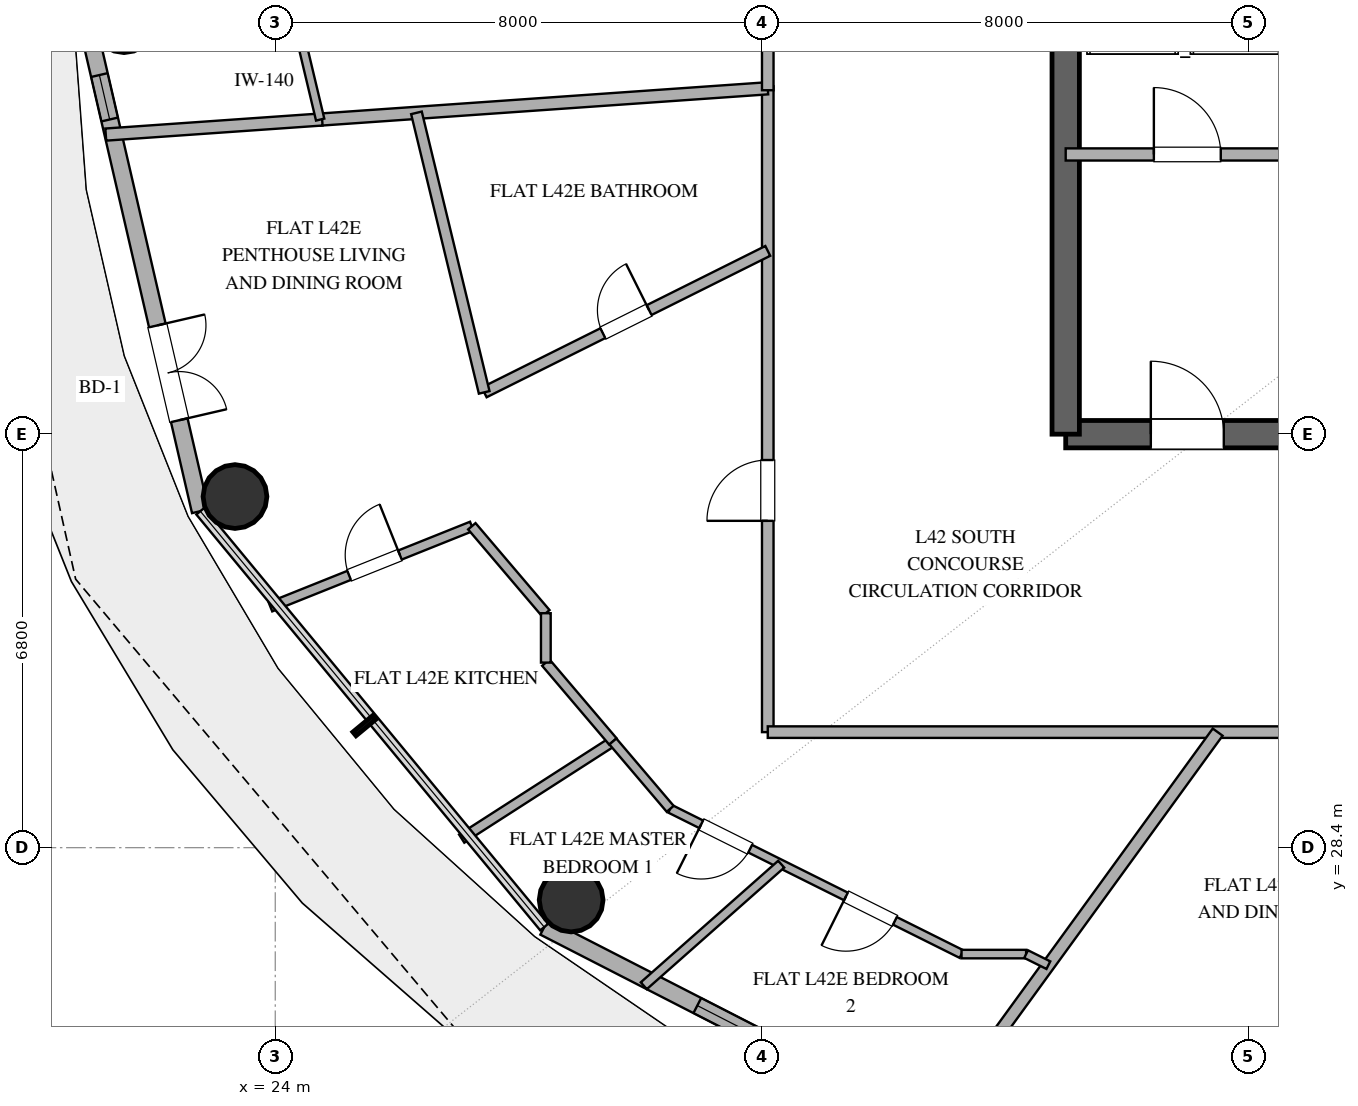
"""IFC4 building model, lengths in metres.
Left out: names, types, materials, properties, quantities, classifications, styles, units other than length and angle.
Written with IfcOpenShell. Run it as: python <this file> out.ifc"""

import sys

from ifc_helpers import new_model, si_unit, direction, frame, frame_2d, origin, origin_2d, place, context, subcontext, project, spatial, rectangle, hollow_circle, extrude, element, fill, save


model = new_model("IFC4")
c1 = context("Model", 3, precision=1e-05, world=origin(), true_north=direction((0.0, 1.0)))
c2 = subcontext(c1, "Body", "Model", "MODEL_VIEW")
j1 = project(units=[si_unit("LENGTHUNIT", "METRE"), si_unit("PLANEANGLEUNIT", "RADIAN")], contexts=[c1])
p1 = place(None, origin())
s1 = spatial("IfcSite", under=j1, at=p1, CompositionType="ELEMENT")
p2 = place(p1, origin())
s2 = spatial("IfcBuilding", under=s1, at=p2, CompositionType="ELEMENT")
p3 = place(p2, frame((0.0, 0.0, 168.6)))
s3 = spatial("IfcBuildingStorey", under=s2, at=p3, CompositionType="ELEMENT", Elevation=168.6)
p4 = place(p3, frame((37.0, 35.2, 0.0), z_axis=(0.0, 0.0, 1.0), x_axis=(1.0, 0.0, 0.0)))
e1 = element("IfcWall", 1, at=p4, inside=s3, PredefinedType="SHEAR", context=c2, shape_type="SweptSolid", body=[
    extrude(rectangle(XDim=4.0, YDim=0.45, at=frame_2d((2.0, 0.0))), origin(), (0.0, 0.0, 1.0), 3.38),
])
p5 = place(p4, frame((1.4, 0.0, 0.0)))
e2 = element("IfcOpeningElement", 2, at=p5, cuts=e1, PredefinedType="OPENING", context=c2, shape_type="SweptSolid", body=[
    extrude(rectangle(XDim=1.2, YDim=2.15, at=frame_2d((0.6, 1.075))), frame((0.0, 0.235, 0.0), z_axis=(0.0, -1.0, 0.0), x_axis=(1.0, 0.0, 0.0)), (0.0, 0.0, 1.0), 0.47),
])
p6 = place(p3, frame((37.0, 35.2, 0.0), z_axis=(0.0, 0.0, 1.0), x_axis=(0.0, 1.0, 0.0)))
e3 = element("IfcWall", 3, at=p6, inside=s3, PredefinedType="SHEAR", context=c2, shape_type="SweptSolid", body=[
    extrude(rectangle(XDim=13.6, YDim=0.45, at=frame_2d((6.8, 0.0))), origin(), (0.0, 0.0, 1.0), 3.38),
])
for number, where, z_axis, x_axis in (
    (4, (21.513, 42.0, 0.0), (0.0, 0.0, 1.0), (1.0, 0.0, 0.0)),
    (5, (23.338, 34.174, 0.0), (0.0, 0.0, 1.0), (1.0, 0.0, 0.0)),
    (6, (28.866, 27.54, 0.0), (0.0, 0.0, 1.0), (1.0, 0.0, 0.0)),
):
    element("IfcColumn", number, at=place(p3, frame(where, z_axis=z_axis, x_axis=x_axis)), inside=s3, PredefinedType="COLUMN", context=c2, shape_type="SweptSolid", body=[
        extrude(hollow_circle(Radius=0.525, WallThickness=0.028, at=origin_2d()), origin(), (0.0, 0.0, 1.0), 3.38),
    ])
p7 = place(p3, frame((20.901, 42.0, 0.0), z_axis=(0.0, 0.0, 1.0), x_axis=(0.225473184558, -0.974249374157, 0.0)))
e7 = element("IfcWall", 7, at=p7, inside=s3, PredefinedType="SOLIDWALL", context=c2, shape_type="SweptSolid", body=[
    extrude(rectangle(XDim=8.28, YDim=0.28, at=frame_2d((4.14, 0.0))), origin(), (0.0, 0.0, 1.0), 3.38),
])
p8 = place(p7, frame((5.144, 0.0, 0.0)))
e8 = element("IfcOpeningElement", 8, at=p8, cuts=e7, PredefinedType="OPENING", context=c2, shape_type="SweptSolid", body=[
    extrude(rectangle(XDim=1.6, YDim=2.25, at=frame_2d((0.8, 1.125))), frame((0.0, 0.15, 0.0), z_axis=(0.0, -1.0, 0.0), x_axis=(1.0, 0.0, 0.0)), (0.0, 0.0, 1.0), 0.3),
])
p9 = place(p7, frame((0.918, 0.0, 0.85)))
e9 = element("IfcOpeningElement", 9, at=p9, cuts=e7, PredefinedType="OPENING", context=c2, shape_type="SweptSolid", body=[
    extrude(rectangle(XDim=0.75, YDim=1.8, at=frame_2d((0.375, 0.9))), frame((0.0, 0.15, 0.0), z_axis=(0.0, -1.0, 0.0), x_axis=(1.0, 0.0, 0.0)), (0.0, 0.0, 1.0), 0.3),
])
p10 = place(p3, frame((28.424, 27.094, 0.0), z_axis=(0.0, 0.0, 1.0), x_axis=(0.889872523182, -0.456209263919, 0.0)))
e10 = element("IfcWall", 10, at=p10, inside=s3, PredefinedType="SOLIDWALL", context=c2, shape_type="SweptSolid", body=[
    extrude(rectangle(XDim=10.016, YDim=0.28, at=frame_2d((5.008, 0.0))), origin(), (0.0, 0.0, 1.0), 3.38),
])
p11 = place(p10, frame((2.829, 0.0, 0.85)))
e11 = element("IfcOpeningElement", 11, at=p11, cuts=e10, PredefinedType="OPENING", context=c2, shape_type="SweptSolid", body=[
    extrude(rectangle(XDim=1.35, YDim=1.8, at=frame_2d((0.675, 0.9))), frame((0.0, 0.15, 0.0), z_axis=(0.0, -1.0, 0.0), x_axis=(1.0, 0.0, 0.0)), (0.0, 0.0, 1.0), 0.3),
])
p12 = place(p10, frame((4.861, 0.0, 0.85)))
e12 = element("IfcOpeningElement", 12, at=p12, cuts=e10, PredefinedType="OPENING", context=c2, shape_type="SweptSolid", body=[
    extrude(rectangle(XDim=1.35, YDim=1.8, at=frame_2d((0.675, 0.9))), frame((0.0, 0.15, 0.0), z_axis=(0.0, -1.0, 0.0), x_axis=(1.0, 0.0, 0.0)), (0.0, 0.0, 1.0), 0.3),
])
p13 = place(p10, frame((7.479, 0.0, 0.85)))
e13 = element("IfcOpeningElement", 13, at=p13, cuts=e10, PredefinedType="OPENING", context=c2, shape_type="SweptSolid", body=[
    extrude(rectangle(XDim=1.0, YDim=1.8, at=frame_2d((0.5, 0.9))), frame((0.0, 0.15, 0.0), z_axis=(0.0, -1.0, 0.0), x_axis=(1.0, 0.0, 0.0)), (0.0, 0.0, 1.0), 0.3),
])
p14 = place(p3, frame((37.0, 39.8, 0.0), z_axis=(0.0, 0.0, 1.0), x_axis=(1.0, 0.0, 0.0)))
e14 = element("IfcWall", 14, at=p14, inside=s3, PredefinedType="SOLIDWALL", context=c2, shape_type="SweptSolid", body=[
    extrude(rectangle(XDim=4.0, YDim=0.2, at=frame_2d((2.0, 0.0))), origin(), (0.0, 0.0, 1.0), 2.74),
])
p15 = place(p14, frame((1.45, 0.0, 0.0)))
e15 = element("IfcOpeningElement", 15, at=p15, cuts=e14, PredefinedType="OPENING", context=c2, shape_type="SweptSolid", body=[
    extrude(rectangle(XDim=1.1, YDim=2.15, at=frame_2d((0.55, 1.075))), frame((0.0, 0.11, 0.0), z_axis=(0.0, -1.0, 0.0), x_axis=(1.0, 0.0, 0.0)), (0.0, 0.0, 1.0), 0.22),
])
p16 = place(p3, frame((32.1, 30.3, 0.0), z_axis=(0.0, 0.0, 1.0), x_axis=(0.0, 1.0, 0.0)))
e16 = element("IfcWall", 16, at=p16, inside=s3, PredefinedType="PARTITIONING", context=c2, shape_type="SweptSolid", body=[
    extrude(rectangle(XDim=10.62, YDim=0.19, at=frame_2d((5.31, 0.0))), origin(), (0.0, 0.0, 1.0), 2.74),
])
p17 = place(p16, frame((3.475, 0.0, 0.0)))
e17 = element("IfcOpeningElement", 17, at=p17, cuts=e16, PredefinedType="OPENING", context=c2, shape_type="SweptSolid", body=[
    extrude(rectangle(XDim=1.0, YDim=2.2, at=frame_2d((0.5, 1.1))), frame((0.0, 0.105, 0.0), z_axis=(0.0, -1.0, 0.0), x_axis=(1.0, 0.0, 0.0)), (0.0, 0.0, 1.0), 0.21),
])
p18 = place(p3, frame((48.308, 30.3, 0.0), z_axis=(0.0, 0.0, 1.0), x_axis=(-1.0, 0.0, 0.0)))
e18 = element("IfcWall", 18, at=p18, inside=s3, PredefinedType="PARTITIONING", context=c2, shape_type="SweptSolid", body=[
    extrude(rectangle(XDim=16.208, YDim=0.19, at=frame_2d((8.104, 0.0))), origin(), (0.0, 0.0, 1.0), 2.74),
])
p19 = place(p18, frame((5.52, 0.0, 0.0)))
e19 = element("IfcOpeningElement", 19, at=p19, cuts=e18, PredefinedType="OPENING", context=c2, shape_type="SweptSolid", body=[
    extrude(rectangle(XDim=1.0, YDim=2.2, at=frame_2d((0.5, 1.1))), frame((0.0, 0.105, 0.0), z_axis=(0.0, -1.0, 0.0), x_axis=(1.0, 0.0, 0.0)), (0.0, 0.0, 1.0), 0.21),
])
p20 = place(p3, frame((32.1, 40.888, 0.0), z_axis=(0.0, 0.0, 1.0), x_axis=(-0.997562906323, -0.069772830877, 0.0)))
e20 = element("IfcWall", 20, at=p20, inside=s3, PredefinedType="PARTITIONING", context=c2, shape_type="SweptSolid", body=[
    extrude(rectangle(XDim=7.38, YDim=0.2, at=frame_2d((3.69, 0.0))), origin(), (0.0, 0.0, 1.0), 2.74),
])
p21 = place(p3, frame((32.1, 40.856, 0.0), z_axis=(0.0, 0.0, 1.0), x_axis=(0.0, 1.0, 0.0)))
e21 = element("IfcWall", 21, at=p21, inside=s3, PredefinedType="PARTITIONING", context=c2, shape_type="SweptSolid", body=[
    extrude(rectangle(XDim=12.844, YDim=0.19, at=frame_2d((6.422, 0.0))), origin(), (0.0, 0.0, 1.0), 2.74),
])
p22 = place(p3, frame((27.436, 35.887, 0.0), z_axis=(0.0, 0.0, 1.0), x_axis=(0.894857716432, 0.446351506485, 0.0)))
e22 = element("IfcWall", 22, at=p22, inside=s3, PredefinedType="PLUMBINGWALL", context=c2, shape_type="SweptSolid", body=[
    extrude(rectangle(XDim=5.212, YDim=0.18, at=frame_2d((2.606, 0.0))), origin(), (0.0, 0.0, 1.0), 2.74),
])
p23 = place(p22, frame((2.181, 0.0, 0.0)))
e23 = element("IfcOpeningElement", 23, at=p23, cuts=e22, PredefinedType="OPENING", context=c2, shape_type="SweptSolid", body=[
    extrude(rectangle(XDim=0.85, YDim=2.1, at=frame_2d((0.425, 1.05))), frame((0.0, 0.1, 0.0), z_axis=(0.0, -1.0, 0.0), x_axis=(1.0, 0.0, 0.0)), (0.0, 0.0, 1.0), 0.2),
])
p24 = place(p3, frame((34.726, 23.73, 0.0), z_axis=(0.0, 0.0, 1.0), x_axis=(0.587785528328, 0.809016793823, 0.0)))
e24 = element("IfcWall", 24, at=p24, inside=s3, PredefinedType="PARTITIONING", context=c2, shape_type="SweptSolid", body=[
    extrude(rectangle(XDim=8.121, YDim=0.2, at=frame_2d((4.061, 0.0))), origin(), (0.0, 0.0, 1.0), 2.74),
])
p25 = place(p3, frame((26.322, 40.484, 0.0), z_axis=(0.0, 0.0, 1.0), x_axis=(0.235484788327, -0.971878034769, 0.0)))
e25 = element("IfcWall", 25, at=p25, inside=s3, PredefinedType="PLUMBINGWALL", context=c2, shape_type="SweptSolid", body=[
    extrude(rectangle(XDim=4.73, YDim=0.18, at=frame_2d((2.365, 0.0))), origin(), (0.0, 0.0, 1.0), 2.74),
])
p26 = place(p3, frame((23.921, 32.36, 0.0), z_axis=(0.0, 0.0, 1.0), x_axis=(0.928353942887, 0.371697399408, 0.0)))
e26 = element("IfcWall", 26, at=p26, inside=s3, PredefinedType="PLUMBINGWALL", context=c2, shape_type="SweptSolid", body=[
    extrude(rectangle(XDim=3.568, YDim=0.16, at=frame_2d((1.784, 0.0))), origin(), (0.0, 0.0, 1.0), 2.74),
])
p27 = place(p26, frame((1.394, 0.0, 0.0)))
e27 = element("IfcOpeningElement", 27, at=p27, cuts=e26, PredefinedType="OPENING", context=c2, shape_type="SweptSolid", body=[
    extrude(rectangle(XDim=0.9, YDim=2.1, at=frame_2d((0.45, 1.05))), frame((0.0, 0.09, 0.0), z_axis=(0.0, -1.0, 0.0), x_axis=(1.0, 0.0, 0.0)), (0.0, 0.0, 1.0), 0.18),
])
p28 = place(p3, frame((21.212, 40.127, 0.0), z_axis=(0.0, 0.0, 1.0), x_axis=(0.997565256009, 0.069739228586, 0.0)))
e28 = element("IfcWall", 28, at=p28, inside=s3, PredefinedType="PARTITIONING", context=c2, shape_type="SweptSolid", body=[
    extrude(rectangle(XDim=3.567, YDim=0.2, at=frame_2d((1.784, 0.0))), origin(), (0.0, 0.0, 1.0), 2.74),
])
p29 = place(p3, frame((35.287, 26.65, 0.0), z_axis=(0.0, 0.0, 1.0), x_axis=(-0.894937323042, 0.44619187333, 0.0)))
e29 = element("IfcWall", 29, at=p29, inside=s3, PredefinedType="PARTITIONING", context=c2, shape_type="SweptSolid", body=[
    extrude(rectangle(XDim=5.354, YDim=0.14, at=frame_2d((2.677, 0.0))), origin(), (0.0, 0.0, 1.0), 2.74),
])
p30 = place(p29, frame((1.224, 0.0, 0.0)))
e30 = element("IfcOpeningElement", 30, at=p30, cuts=e29, PredefinedType="OPENING", context=c2, shape_type="SweptSolid", body=[
    extrude(rectangle(XDim=0.9, YDim=2.1, at=frame_2d((0.45, 1.05))), frame((0.0, 0.08, 0.0), z_axis=(0.0, -1.0, 0.0), x_axis=(1.0, 0.0, 0.0)), (0.0, 0.0, 1.0), 0.16),
])
p31 = place(p29, frame((3.884, 0.0, 0.0)))
e31 = element("IfcOpeningElement", 31, at=p31, cuts=e29, PredefinedType="OPENING", context=c2, shape_type="SweptSolid", body=[
    extrude(rectangle(XDim=0.9, YDim=2.1, at=frame_2d((0.45, 1.05))), frame((0.0, 0.08, 0.0), z_axis=(0.0, -1.0, 0.0), x_axis=(1.0, 0.0, 0.0)), (0.0, 0.0, 1.0), 0.16),
])
p32 = place(p3, frame((32.321, 28.128, 0.0), z_axis=(0.0, 0.0, 1.0), x_axis=(-0.748956405403, -0.6626192744, 0.0)))
e32 = element("IfcWall", 32, at=p32, inside=s3, PredefinedType="PARTITIONING", context=c2, shape_type="SweptSolid", body=[
    extrude(rectangle(XDim=3.017, YDim=0.15, at=frame_2d((1.509, 0.0))), origin(), (0.0, 0.0, 1.0), 2.74),
])
p33 = place(p3, frame((29.553, 30.146, 0.0), z_axis=(0.0, 0.0, 1.0), x_axis=(-0.841296531109, -0.540573904978, 0.0)))
e33 = element("IfcWall", 33, at=p33, inside=s3, PredefinedType="PLUMBINGWALL", context=c2, shape_type="SweptSolid", body=[
    extrude(rectangle(XDim=2.956, YDim=0.16, at=frame_2d((1.478, 0.0))), origin(), (0.0, 0.0, 1.0), 2.74),
])
p34 = place(p3, frame((27.233, 33.686, 0.0), z_axis=(0.0, 0.0, 1.0), x_axis=(0.648078524475, -0.761573519835, 0.0)))
e34 = element("IfcWall", 34, at=p34, inside=s3, PredefinedType="PLUMBINGWALL", context=c2, shape_type="SweptSolid", body=[
    extrude(rectangle(XDim=1.878, YDim=0.16, at=frame_2d((0.939, 0.0))), origin(), (0.0, 0.0, 1.0), 2.74),
])
p35 = place(p3, frame((28.45, 31.443, 0.0), z_axis=(0.0, 0.0, 1.0), x_axis=(0.64788149294, -0.761741144422, 0.0)))
e35 = element("IfcWall", 35, at=p35, inside=s3, PredefinedType="PLUMBINGWALL", context=c2, shape_type="SweptSolid", body=[
    extrude(rectangle(XDim=1.702, YDim=0.16, at=frame_2d((0.851, 0.0))), origin(), (0.0, 0.0, 1.0), 2.74),
])
p36 = place(p3, frame((24.739, 40.373, 0.0), z_axis=(0.0, 0.0, 1.0), x_axis=(-0.231561310927, 0.972820311919, 0.0)))
e36 = element("IfcWall", 36, at=p36, inside=s3, PredefinedType="PARTITIONING", context=c2, shape_type="SweptSolid", body=[
    extrude(rectangle(XDim=1.672, YDim=0.14, at=frame_2d((0.836, 0.0))), origin(), (0.0, 0.0, 1.0), 2.74),
])
p37 = place(p3, frame((29.553, 30.146, 0.0), z_axis=(0.0, 0.0, 1.0), x_axis=(0.647896934681, -0.761728010533, 0.0)))
e37 = element("IfcWall", 37, at=p37, inside=s3, PredefinedType="PARTITIONING", context=c2, shape_type="SweptSolid", body=[
    extrude(rectangle(XDim=1.454, YDim=0.15, at=frame_2d((0.727, 0.0))), origin(), (0.0, 0.0, 1.0), 2.74),
])
p38 = place(p3, frame((36.349, 26.65, 0.0), z_axis=(0.0, 0.0, 1.0), x_axis=(-1.0, 0.0, 0.0)))
e38 = element("IfcWall", 38, at=p38, inside=s3, PredefinedType="PARTITIONING", context=c2, shape_type="SweptSolid", body=[
    extrude(rectangle(XDim=1.062, YDim=0.14, at=frame_2d((0.531, 0.0))), origin(), (0.0, 0.0, 1.0), 2.74),
])
p39 = place(p3, frame((28.45, 32.256, 0.0), z_axis=(0.0, 0.0, 1.0), x_axis=(0.0, -1.0, 0.0)))
e39 = element("IfcWall", 39, at=p39, inside=s3, PredefinedType="PLUMBINGWALL", context=c2, shape_type="SweptSolid", body=[
    extrude(rectangle(XDim=0.812, YDim=0.16, at=frame_2d((0.406, 0.0))), origin(), (0.0, 0.0, 1.0), 2.74),
])
p40 = place(p3, frame((36.715, 26.468, 0.0), z_axis=(0.0, 0.0, 1.0), x_axis=(-0.895142158028, 0.445780794698, 0.0)))
e40 = element("IfcWall", 40, at=p40, inside=s3, PredefinedType="PARTITIONING", context=c2, shape_type="SweptSolid", body=[
    extrude(rectangle(XDim=0.409, YDim=0.14, at=frame_2d((0.205, 0.0))), origin(), (0.0, 0.0, 1.0), 2.74),
])
p41 = place(p8, origin())
e41 = element("IfcDoor", 41, at=p41, inside=s3, OperationType="DOUBLE_DOOR_SINGLE_SWING", PredefinedType="DOOR", context=c2, shape_type="SweptSolid", body=[
    extrude(rectangle(XDim=1.6, YDim=2.25, at=frame_2d((0.8, 1.125))), frame((0.0, 0.025, 0.0), z_axis=(0.0, -1.0, 0.0), x_axis=(1.0, 0.0, 0.0)), (0.0, 0.0, 1.0), 0.05),
])
fill(e8, e41)
p42 = place(p11, origin())
e42 = element("IfcWindow", 42, at=p42, inside=s3, PartitioningType="SINGLE_PANEL", PredefinedType="WINDOW", context=c2, shape_type="SweptSolid", body=[
    extrude(rectangle(XDim=1.35, YDim=1.8, at=frame_2d((0.675, 0.9))), frame((0.0, 0.03, 0.0), z_axis=(0.0, -1.0, 0.0), x_axis=(1.0, 0.0, 0.0)), (0.0, 0.0, 1.0), 0.06),
])
fill(e11, e42)
p43 = place(p9, origin())
e43 = element("IfcWindow", 43, at=p43, inside=s3, PartitioningType="SINGLE_PANEL", PredefinedType="WINDOW", context=c2, shape_type="SweptSolid", body=[
    extrude(rectangle(XDim=0.75, YDim=1.8, at=frame_2d((0.375, 0.9))), frame((0.0, 0.03, 0.0), z_axis=(0.0, -1.0, 0.0), x_axis=(1.0, 0.0, 0.0)), (0.0, 0.0, 1.0), 0.06),
])
fill(e9, e43)
p44 = place(p5, origin())
e44 = element("IfcDoor", 44, at=p44, inside=s3, OperationType="SINGLE_SWING_LEFT", PredefinedType="DOOR", context=c2, shape_type="SweptSolid", body=[
    extrude(rectangle(XDim=1.2, YDim=2.15, at=frame_2d((0.6, 1.075))), frame((0.0, 0.025, 0.0), z_axis=(0.0, -1.0, 0.0), x_axis=(1.0, 0.0, 0.0)), (0.0, 0.0, 1.0), 0.05),
])
fill(e2, e44)
p45 = place(p15, origin())
e45 = element("IfcDoor", 45, at=p45, inside=s3, OperationType="SINGLE_SWING_LEFT", PredefinedType="DOOR", context=c2, shape_type="SweptSolid", body=[
    extrude(rectangle(XDim=1.1, YDim=2.15, at=frame_2d((0.55, 1.075))), frame((0.0, 0.025, 0.0), z_axis=(0.0, -1.0, 0.0), x_axis=(1.0, 0.0, 0.0)), (0.0, 0.0, 1.0), 0.05),
])
fill(e15, e45)
p46 = place(p17, origin())
e46 = element("IfcDoor", 46, at=p46, inside=s3, OperationType="SINGLE_SWING_LEFT", PredefinedType="DOOR", context=c2, shape_type="SweptSolid", body=[
    extrude(rectangle(XDim=1.0, YDim=2.2, at=frame_2d((0.5, 1.1))), frame((0.0, 0.025, 0.0), z_axis=(0.0, -1.0, 0.0), x_axis=(1.0, 0.0, 0.0)), (0.0, 0.0, 1.0), 0.05),
])
fill(e17, e46)
p47 = place(p23, origin())
e47 = element("IfcDoor", 47, at=p47, inside=s3, OperationType="SINGLE_SWING_RIGHT", PredefinedType="DOOR", context=c2, shape_type="SweptSolid", body=[
    extrude(rectangle(XDim=0.85, YDim=2.1, at=frame_2d((0.425, 1.05))), frame((0.0, 0.025, 0.0), z_axis=(0.0, -1.0, 0.0), x_axis=(1.0, 0.0, 0.0)), (0.0, 0.0, 1.0), 0.05),
])
fill(e23, e47)
p48 = place(p27, origin())
e48 = element("IfcDoor", 48, at=p48, inside=s3, OperationType="SINGLE_SWING_RIGHT", PredefinedType="DOOR", context=c2, shape_type="SweptSolid", body=[
    extrude(rectangle(XDim=0.9, YDim=2.1, at=frame_2d((0.45, 1.05))), frame((0.0, 0.025, 0.0), z_axis=(0.0, -1.0, 0.0), x_axis=(1.0, 0.0, 0.0)), (0.0, 0.0, 1.0), 0.05),
])
fill(e27, e48)
p49 = place(p30, origin())
e49 = element("IfcDoor", 49, at=p49, inside=s3, OperationType="SINGLE_SWING_RIGHT", PredefinedType="DOOR", context=c2, shape_type="SweptSolid", body=[
    extrude(rectangle(XDim=0.9, YDim=2.1, at=frame_2d((0.45, 1.05))), frame((0.0, 0.025, 0.0), z_axis=(0.0, -1.0, 0.0), x_axis=(1.0, 0.0, 0.0)), (0.0, 0.0, 1.0), 0.05),
])
fill(e30, e49)
p50 = place(p31, origin())
e50 = element("IfcDoor", 50, at=p50, inside=s3, OperationType="SINGLE_SWING_RIGHT", PredefinedType="DOOR", context=c2, shape_type="SweptSolid", body=[
    extrude(rectangle(XDim=0.9, YDim=2.1, at=frame_2d((0.45, 1.05))), frame((0.0, 0.025, 0.0), z_axis=(0.0, -1.0, 0.0), x_axis=(1.0, 0.0, 0.0)), (0.0, 0.0, 1.0), 0.05),
])
fill(e31, e50)
save(model, sys.argv[1])
